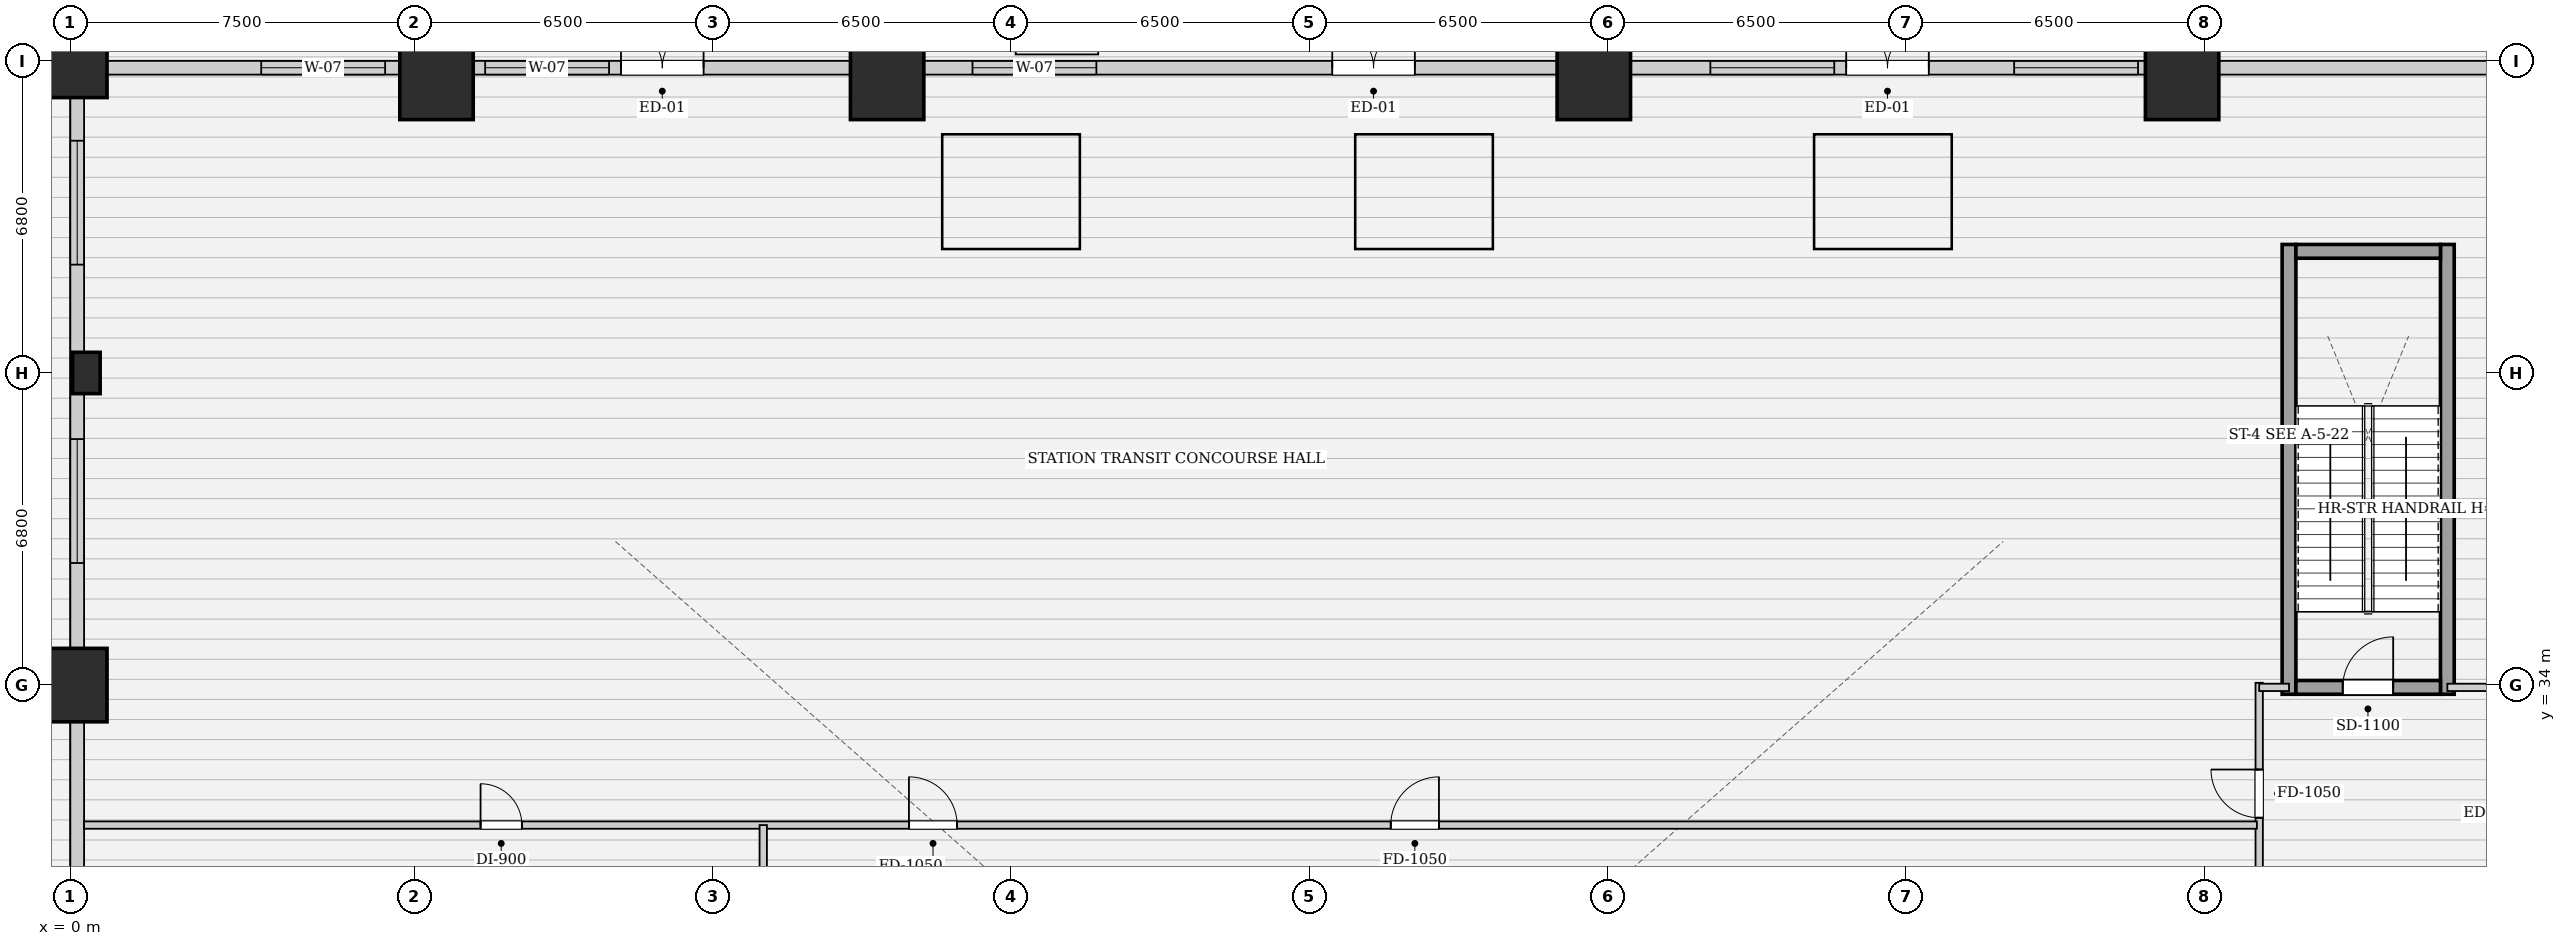
"""IFC4 building model, lengths in metres.
Left out: names, types, materials, properties, quantities, classifications, styles, units other than length and angle.
Written with IfcOpenShell. Run it as: python <this file> out.ifc"""

import sys

from ifc_helpers import new_model, si_unit, direction, frame, frame_2d, origin, origin_2d, place, context, subcontext, project, spatial, rectangle, extrude, element, fill, save


model = new_model("IFC4")
c1 = context("Model", 3, precision=1e-05, world=origin(), true_north=direction((0.0, 1.0)))
c2 = subcontext(c1, "Body", "Model", "MODEL_VIEW")
j1 = project(units=[si_unit("LENGTHUNIT", "METRE"), si_unit("PLANEANGLEUNIT", "RADIAN")], contexts=[c1])
p1 = place(None, origin())
s1 = spatial("IfcSite", under=j1, at=p1, CompositionType="ELEMENT")
p2 = place(p1, origin())
s2 = spatial("IfcBuilding", under=s1, at=p2, CompositionType="ELEMENT")
p3 = place(p2, origin())
s3 = spatial("IfcBuildingStorey", under=s2, at=p3, CompositionType="ELEMENT", Elevation=0.0)
for number, where, z_axis, x_axis in (
    (1, (0.0, 34.0, 0.0), (0.0, 0.0, 1.0), (1.0, 0.0, 0.0)),
    (2, (0.0, 47.6, 0.0), (0.0, 0.0, 1.0), (1.0, 0.0, 0.0)),
    (3, (7.98, 47.12, 0.0), (0.0, 0.0, 1.0), (1.0, 0.0, 0.0)),
    (4, (46.02, 47.12, 0.0), (0.0, 0.0, 1.0), (1.0, 0.0, 0.0)),
    (5, (17.8, 47.12, 0.0), (0.0, 0.0, 1.0), (1.0, 0.0, 0.0)),
    (6, (33.2, 47.12, 0.0), (0.0, 0.0, 1.0), (1.0, 0.0, 0.0)),
):
    element("IfcColumn", number, at=place(p3, frame(where, z_axis=z_axis, x_axis=x_axis)), inside=s3, PredefinedType="COLUMN", context=c2, shape_type="SweptSolid", body=[
        extrude(rectangle(XDim=1.6, YDim=1.6, at=origin_2d()), origin(), (0.0, 0.0, 1.0), 6.0),
    ])
p4 = place(p3, frame((0.35, 40.8, 0.0), z_axis=(0.0, 0.0, 1.0), x_axis=(1.0, 0.0, 0.0)))
e7 = element("IfcColumn", 7, at=p4, inside=s3, PredefinedType="PILASTER", context=c2, shape_type="SweptSolid", body=[
    extrude(rectangle(XDim=0.6, YDim=0.9, at=origin_2d()), origin(), (0.0, 0.0, 1.0), 6.0),
])
p5 = place(p3, frame((0.16, 47.45, 0.0), z_axis=(0.0, 0.0, 1.0), x_axis=(1.0, 0.0, 0.0)))
e8 = element("IfcWall", 8, at=p5, inside=s3, PredefinedType="SOLIDWALL", context=c2, shape_type="SweptSolid", body=[
    extrude(rectangle(XDim=53.68, YDim=0.3, at=frame_2d((26.84, 0.0))), origin(), (0.0, 0.0, 1.0), 4.565),
])
p6 = place(p5, frame((27.34, 0.0, 0.0)))
e9 = element("IfcOpeningElement", 9, at=p6, cuts=e8, PredefinedType="OPENING", context=c2, shape_type="SweptSolid", body=[
    extrude(rectangle(XDim=1.8, YDim=2.2, at=frame_2d((0.9, 1.1))), frame((0.0, 0.16, 0.0), z_axis=(0.0, -1.0, 0.0), x_axis=(1.0, 0.0, 0.0)), (0.0, 0.0, 1.0), 0.32),
])
p7 = place(p5, frame((11.84, 0.0, 0.0)))
e10 = element("IfcOpeningElement", 10, at=p7, cuts=e8, PredefinedType="OPENING", context=c2, shape_type="SweptSolid", body=[
    extrude(rectangle(XDim=1.8, YDim=2.2, at=frame_2d((0.9, 1.1))), frame((0.0, 0.16, 0.0), z_axis=(0.0, -1.0, 0.0), x_axis=(1.0, 0.0, 0.0)), (0.0, 0.0, 1.0), 0.32),
])
p8 = place(p5, frame((38.54, 0.0, 0.0)))
e11 = element("IfcOpeningElement", 11, at=p8, cuts=e8, PredefinedType="OPENING", context=c2, shape_type="SweptSolid", body=[
    extrude(rectangle(XDim=1.8, YDim=2.2, at=frame_2d((0.9, 1.1))), frame((0.0, 0.16, 0.0), z_axis=(0.0, -1.0, 0.0), x_axis=(1.0, 0.0, 0.0)), (0.0, 0.0, 1.0), 0.32),
])
p9 = place(p5, frame((4.0, 0.0, 0.9)))
e12 = element("IfcOpeningElement", 12, at=p9, cuts=e8, PredefinedType="OPENING", context=c2, shape_type="SweptSolid", body=[
    extrude(rectangle(XDim=2.7, YDim=2.1, at=frame_2d((1.35, 1.05))), frame((0.0, 0.16, 0.0), z_axis=(0.0, -1.0, 0.0), x_axis=(1.0, 0.0, 0.0)), (0.0, 0.0, 1.0), 0.32),
])
p10 = place(p5, frame((8.88, 0.0, 0.9)))
e13 = element("IfcOpeningElement", 13, at=p10, cuts=e8, PredefinedType="OPENING", context=c2, shape_type="SweptSolid", body=[
    extrude(rectangle(XDim=2.7, YDim=2.1, at=frame_2d((1.35, 1.05))), frame((0.0, 0.16, 0.0), z_axis=(0.0, -1.0, 0.0), x_axis=(1.0, 0.0, 0.0)), (0.0, 0.0, 1.0), 0.32),
])
p11 = place(p5, frame((19.5, 0.0, 0.9)))
e14 = element("IfcOpeningElement", 14, at=p11, cuts=e8, PredefinedType="OPENING", context=c2, shape_type="SweptSolid", body=[
    extrude(rectangle(XDim=2.7, YDim=2.1, at=frame_2d((1.35, 1.05))), frame((0.0, 0.16, 0.0), z_axis=(0.0, -1.0, 0.0), x_axis=(1.0, 0.0, 0.0)), (0.0, 0.0, 1.0), 0.32),
])
p12 = place(p5, frame((35.58, 0.0, 0.9)))
e15 = element("IfcOpeningElement", 15, at=p12, cuts=e8, PredefinedType="OPENING", context=c2, shape_type="SweptSolid", body=[
    extrude(rectangle(XDim=2.7, YDim=2.1, at=frame_2d((1.35, 1.05))), frame((0.0, 0.16, 0.0), z_axis=(0.0, -1.0, 0.0), x_axis=(1.0, 0.0, 0.0)), (0.0, 0.0, 1.0), 0.32),
])
p13 = place(p5, frame((42.2, 0.0, 0.9)))
e16 = element("IfcOpeningElement", 16, at=p13, cuts=e8, PredefinedType="OPENING", context=c2, shape_type="SweptSolid", body=[
    extrude(rectangle(XDim=2.7, YDim=2.1, at=frame_2d((1.35, 1.05))), frame((0.0, 0.16, 0.0), z_axis=(0.0, -1.0, 0.0), x_axis=(1.0, 0.0, 0.0)), (0.0, 0.0, 1.0), 0.32),
])
p14 = place(p3, frame((0.15, 0.16, 0.0), z_axis=(0.0, 0.0, 1.0), x_axis=(0.0, 1.0, 0.0)))
e17 = element("IfcWall", 17, at=p14, inside=s3, PredefinedType="SOLIDWALL", context=c2, shape_type="SweptSolid", body=[
    extrude(rectangle(XDim=47.28, YDim=0.3, at=frame_2d((23.64, 0.0))), origin(), (0.0, 0.0, 1.0), 4.565),
])
p15 = place(p14, frame((17.46, 0.0, 0.0)))
e18 = element("IfcOpeningElement", 18, at=p15, cuts=e17, PredefinedType="OPENING", context=c2, shape_type="SweptSolid", body=[
    extrude(rectangle(XDim=1.8, YDim=2.2, at=frame_2d((0.9, 1.1))), frame((0.0, 0.16, 0.0), z_axis=(0.0, -1.0, 0.0), x_axis=(1.0, 0.0, 0.0)), (0.0, 0.0, 1.0), 0.32),
])
p16 = place(p14, frame((3.33, 0.0, 0.9)))
e19 = element("IfcOpeningElement", 19, at=p16, cuts=e17, PredefinedType="OPENING", context=c2, shape_type="SweptSolid", body=[
    extrude(rectangle(XDim=2.7, YDim=2.1, at=frame_2d((1.35, 1.05))), frame((0.0, 0.16, 0.0), z_axis=(0.0, -1.0, 0.0), x_axis=(1.0, 0.0, 0.0)), (0.0, 0.0, 1.0), 0.32),
])
p17 = place(p14, frame((9.78, 0.0, 0.9)))
e20 = element("IfcOpeningElement", 20, at=p17, cuts=e17, PredefinedType="OPENING", context=c2, shape_type="SweptSolid", body=[
    extrude(rectangle(XDim=2.7, YDim=2.1, at=frame_2d((1.35, 1.05))), frame((0.0, 0.16, 0.0), z_axis=(0.0, -1.0, 0.0), x_axis=(1.0, 0.0, 0.0)), (0.0, 0.0, 1.0), 0.32),
])
p18 = place(p14, frame((36.5, 0.0, 0.9)))
e21 = element("IfcOpeningElement", 21, at=p18, cuts=e17, PredefinedType="OPENING", context=c2, shape_type="SweptSolid", body=[
    extrude(rectangle(XDim=2.7, YDim=2.1, at=frame_2d((1.35, 1.05))), frame((0.0, 0.16, 0.0), z_axis=(0.0, -1.0, 0.0), x_axis=(1.0, 0.0, 0.0)), (0.0, 0.0, 1.0), 0.32),
])
p19 = place(p14, frame((43.0, 0.0, 0.9)))
e22 = element("IfcOpeningElement", 22, at=p19, cuts=e17, PredefinedType="OPENING", context=c2, shape_type="SweptSolid", body=[
    extrude(rectangle(XDim=2.7, YDim=2.1, at=frame_2d((1.35, 1.05))), frame((0.0, 0.16, 0.0), z_axis=(0.0, -1.0, 0.0), x_axis=(1.0, 0.0, 0.0)), (0.0, 0.0, 1.0), 0.32),
])
for number, where, z_axis, x_axis in (
    (23, (48.35, 33.8, 0.0), (0.0, 0.0, 1.0), (0.0, 1.0, 0.0)),
    (24, (51.8, 33.8, 0.0), (0.0, 0.0, 1.0), (0.0, 1.0, 0.0)),
):
    element("IfcWall", number, at=place(p3, frame(where, z_axis=z_axis, x_axis=x_axis)), inside=s3, PredefinedType="SHEAR", context=c2, shape_type="SweptSolid", body=[
        extrude(rectangle(XDim=9.8, YDim=0.3, at=frame_2d((4.9, 0.0))), origin(), (0.0, 0.0, 1.0), 5.68),
    ])
p20 = place(p3, frame((48.5, 43.45, 0.0), z_axis=(0.0, 0.0, 1.0), x_axis=(1.0, 0.0, 0.0)))
e25 = element("IfcWall", 25, at=p20, inside=s3, PredefinedType="SHEAR", context=c2, shape_type="SweptSolid", body=[
    extrude(rectangle(XDim=3.15, YDim=0.3, at=frame_2d((1.575, 0.0))), origin(), (0.0, 0.0, 1.0), 5.68),
])
p21 = place(p3, frame((48.5, 33.95, 0.0), z_axis=(0.0, 0.0, 1.0), x_axis=(1.0, 0.0, 0.0)))
e26 = element("IfcWall", 26, at=p21, inside=s3, PredefinedType="SHEAR", context=c2, shape_type="SweptSolid", body=[
    extrude(rectangle(XDim=3.15, YDim=0.3, at=frame_2d((1.575, 0.0))), origin(), (0.0, 0.0, 1.0), 5.68),
])
p22 = place(p21, frame((1.02, 0.0, 0.0)))
e27 = element("IfcOpeningElement", 27, at=p22, cuts=e26, PredefinedType="OPENING", context=c2, shape_type="SweptSolid", body=[
    extrude(rectangle(XDim=1.1, YDim=2.05, at=frame_2d((0.55, 1.025))), frame((0.0, 0.16, 0.0), z_axis=(0.0, -1.0, 0.0), x_axis=(1.0, 0.0, 0.0)), (0.0, 0.0, 1.0), 0.32),
])
p23 = place(p3, frame((47.7, 29.05, 0.0), z_axis=(0.0, 0.0, 1.0), x_axis=(0.0, 1.0, 0.0)))
e28 = element("IfcWall", 28, at=p23, inside=s3, PredefinedType="PARTITIONING", context=c2, shape_type="SweptSolid", body=[
    extrude(rectangle(XDim=5.0, YDim=0.16, at=frame_2d((2.5, 0.0))), origin(), (0.0, 0.0, 1.0), 5.68),
])
p24 = place(p23, frame((2.06, 0.0, 0.0)))
e29 = element("IfcOpeningElement", 29, at=p24, cuts=e28, PredefinedType="OPENING", context=c2, shape_type="SweptSolid", body=[
    extrude(rectangle(XDim=1.05, YDim=2.05, at=frame_2d((0.525, 1.025))), frame((0.0, 0.09, 0.0), z_axis=(0.0, -1.0, 0.0), x_axis=(1.0, 0.0, 0.0)), (0.0, 0.0, 1.0), 0.18),
])
p25 = place(p3, frame((47.7, 33.95, 0.0), z_axis=(0.0, 0.0, 1.0), x_axis=(1.0, 0.0, 0.0)))
e30 = element("IfcWall", 30, at=p25, inside=s3, PredefinedType="PARTITIONING", context=c2, shape_type="SweptSolid", body=[
    extrude(rectangle(XDim=0.65, YDim=0.16, at=frame_2d((0.325, 0.0))), origin(), (0.0, 0.0, 1.0), 5.68),
])
p26 = place(p3, frame((51.8, 33.95, 0.0), z_axis=(0.0, 0.0, 1.0), x_axis=(1.0, 0.0, 0.0)))
e31 = element("IfcWall", 31, at=p26, inside=s3, PredefinedType="PARTITIONING", context=c2, shape_type="SweptSolid", body=[
    extrude(rectangle(XDim=1.92, YDim=0.16, at=frame_2d((0.96, 0.0))), origin(), (0.0, 0.0, 1.0), 5.68),
])
p27 = place(p3, frame((0.3, 30.95, 0.0), z_axis=(0.0, 0.0, 1.0), x_axis=(1.0, 0.0, 0.0)))
e32 = element("IfcWall", 32, at=p27, inside=s3, PredefinedType="PARTITIONING", context=c2, shape_type="SweptSolid", body=[
    extrude(rectangle(XDim=47.35, YDim=0.16, at=frame_2d((23.675, 0.0))), origin(), (0.0, 0.0, 1.0), 5.68),
])
p28 = place(p27, frame((17.975, 0.0, 0.0)))
e33 = element("IfcOpeningElement", 33, at=p28, cuts=e32, PredefinedType="OPENING", context=c2, shape_type="SweptSolid", body=[
    extrude(rectangle(XDim=1.05, YDim=2.05, at=frame_2d((0.525, 1.025))), frame((0.0, 0.09, 0.0), z_axis=(0.0, -1.0, 0.0), x_axis=(1.0, 0.0, 0.0)), (0.0, 0.0, 1.0), 0.18),
])
p29 = place(p27, frame((28.475, 0.0, 0.0)))
e34 = element("IfcOpeningElement", 34, at=p29, cuts=e32, PredefinedType="OPENING", context=c2, shape_type="SweptSolid", body=[
    extrude(rectangle(XDim=1.05, YDim=2.05, at=frame_2d((0.525, 1.025))), frame((0.0, 0.09, 0.0), z_axis=(0.0, -1.0, 0.0), x_axis=(1.0, 0.0, 0.0)), (0.0, 0.0, 1.0), 0.18),
])
p30 = place(p27, frame((8.64, 0.0, 0.0)))
e35 = element("IfcOpeningElement", 35, at=p30, cuts=e32, PredefinedType="OPENING", context=c2, shape_type="SweptSolid", body=[
    extrude(rectangle(XDim=0.9, YDim=2.05, at=frame_2d((0.45, 1.025))), frame((0.0, 0.09, 0.0), z_axis=(0.0, -1.0, 0.0), x_axis=(1.0, 0.0, 0.0)), (0.0, 0.0, 1.0), 0.18),
])
p31 = place(p3, frame((15.1, 14.98, 0.0), z_axis=(0.0, 0.0, 1.0), x_axis=(0.0, 1.0, 0.0)))
e36 = element("IfcWall", 36, at=p31, inside=s3, PredefinedType="PARTITIONING", context=c2, shape_type="SweptSolid", body=[
    extrude(rectangle(XDim=15.97, YDim=0.16, at=frame_2d((7.985, 0.0))), origin(), (0.0, 0.0, 1.0), 5.68),
])
p32 = place(p31, frame((4.225, 0.0, 0.0)))
e37 = element("IfcOpeningElement", 37, at=p32, cuts=e36, PredefinedType="OPENING", context=c2, shape_type="SweptSolid", body=[
    extrude(rectangle(XDim=1.05, YDim=2.05, at=frame_2d((0.525, 1.025))), frame((0.0, 0.09, 0.0), z_axis=(0.0, -1.0, 0.0), x_axis=(1.0, 0.0, 0.0)), (0.0, 0.0, 1.0), 0.18),
])
p33 = place(p6, origin())
e38 = element("IfcDoor", 38, at=p33, inside=s3, OperationType="DOUBLE_SWING_LEFT", PredefinedType="DOOR", context=c2, shape_type="SweptSolid", body=[
    extrude(rectangle(XDim=1.8, YDim=2.2, at=frame_2d((0.9, 1.1))), frame((0.0, 0.025, 0.0), z_axis=(0.0, -1.0, 0.0), x_axis=(1.0, 0.0, 0.0)), (0.0, 0.0, 1.0), 0.05),
])
fill(e9, e38)
p34 = place(p7, origin())
e39 = element("IfcDoor", 39, at=p34, inside=s3, OperationType="DOUBLE_SWING_LEFT", PredefinedType="DOOR", context=c2, shape_type="SweptSolid", body=[
    extrude(rectangle(XDim=1.8, YDim=2.2, at=frame_2d((0.9, 1.1))), frame((0.0, 0.025, 0.0), z_axis=(0.0, -1.0, 0.0), x_axis=(1.0, 0.0, 0.0)), (0.0, 0.0, 1.0), 0.05),
])
fill(e10, e39)
p35 = place(p8, origin())
e40 = element("IfcDoor", 40, at=p35, inside=s3, OperationType="DOUBLE_SWING_LEFT", PredefinedType="DOOR", context=c2, shape_type="SweptSolid", body=[
    extrude(rectangle(XDim=1.8, YDim=2.2, at=frame_2d((0.9, 1.1))), frame((0.0, 0.025, 0.0), z_axis=(0.0, -1.0, 0.0), x_axis=(1.0, 0.0, 0.0)), (0.0, 0.0, 1.0), 0.05),
])
fill(e11, e40)
p36 = place(p22, origin())
e41 = element("IfcDoor", 41, at=p36, inside=s3, OperationType="SINGLE_SWING_RIGHT", PredefinedType="DOOR", context=c2, shape_type="SweptSolid", body=[
    extrude(rectangle(XDim=1.1, YDim=2.05, at=frame_2d((0.55, 1.025))), frame((0.0, 0.025, 0.0), z_axis=(0.0, -1.0, 0.0), x_axis=(1.0, 0.0, 0.0)), (0.0, 0.0, 1.0), 0.05),
])
fill(e27, e41)
p37 = place(p24, origin())
e42 = element("IfcDoor", 42, at=p37, inside=s3, OperationType="SINGLE_SWING_RIGHT", PredefinedType="DOOR", context=c2, shape_type="SweptSolid", body=[
    extrude(rectangle(XDim=1.05, YDim=2.05, at=frame_2d((0.525, 1.025))), frame((0.0, 0.025, 0.0), z_axis=(0.0, -1.0, 0.0), x_axis=(1.0, 0.0, 0.0)), (0.0, 0.0, 1.0), 0.05),
])
fill(e29, e42)
p38 = place(p28, origin())
e43 = element("IfcDoor", 43, at=p38, inside=s3, OperationType="SINGLE_SWING_LEFT", PredefinedType="DOOR", context=c2, shape_type="SweptSolid", body=[
    extrude(rectangle(XDim=1.05, YDim=2.05, at=frame_2d((0.525, 1.025))), frame((0.0, 0.025, 0.0), z_axis=(0.0, -1.0, 0.0), x_axis=(1.0, 0.0, 0.0)), (0.0, 0.0, 1.0), 0.05),
])
fill(e33, e43)
p39 = place(p29, origin())
e44 = element("IfcDoor", 44, at=p39, inside=s3, OperationType="SINGLE_SWING_RIGHT", PredefinedType="DOOR", context=c2, shape_type="SweptSolid", body=[
    extrude(rectangle(XDim=1.05, YDim=2.05, at=frame_2d((0.525, 1.025))), frame((0.0, 0.025, 0.0), z_axis=(0.0, -1.0, 0.0), x_axis=(1.0, 0.0, 0.0)), (0.0, 0.0, 1.0), 0.05),
])
fill(e34, e44)
p40 = place(p30, origin())
e45 = element("IfcDoor", 45, at=p40, inside=s3, OperationType="SINGLE_SWING_LEFT", PredefinedType="DOOR", context=c2, shape_type="SweptSolid", body=[
    extrude(rectangle(XDim=0.9, YDim=2.05, at=frame_2d((0.45, 1.025))), frame((0.0, 0.025, 0.0), z_axis=(0.0, -1.0, 0.0), x_axis=(1.0, 0.0, 0.0)), (0.0, 0.0, 1.0), 0.05),
])
fill(e35, e45)
p41 = place(p9, origin())
e46 = element("IfcWindow", 46, at=p41, inside=s3, PartitioningType="TRIPLE_PANEL_VERTICAL", PredefinedType="WINDOW", context=c2, shape_type="SweptSolid", body=[
    extrude(rectangle(XDim=2.7, YDim=2.1, at=frame_2d((1.35, 1.05))), frame((0.0, 0.03, 0.0), z_axis=(0.0, -1.0, 0.0), x_axis=(1.0, 0.0, 0.0)), (0.0, 0.0, 1.0), 0.06),
])
fill(e12, e46)
p42 = place(p10, origin())
e47 = element("IfcWindow", 47, at=p42, inside=s3, PartitioningType="TRIPLE_PANEL_VERTICAL", PredefinedType="WINDOW", context=c2, shape_type="SweptSolid", body=[
    extrude(rectangle(XDim=2.7, YDim=2.1, at=frame_2d((1.35, 1.05))), frame((0.0, 0.03, 0.0), z_axis=(0.0, -1.0, 0.0), x_axis=(1.0, 0.0, 0.0)), (0.0, 0.0, 1.0), 0.06),
])
fill(e13, e47)
p43 = place(p11, origin())
e48 = element("IfcWindow", 48, at=p43, inside=s3, PartitioningType="TRIPLE_PANEL_VERTICAL", PredefinedType="WINDOW", context=c2, shape_type="SweptSolid", body=[
    extrude(rectangle(XDim=2.7, YDim=2.1, at=frame_2d((1.35, 1.05))), frame((0.0, 0.03, 0.0), z_axis=(0.0, -1.0, 0.0), x_axis=(1.0, 0.0, 0.0)), (0.0, 0.0, 1.0), 0.06),
])
fill(e14, e48)
p44 = place(p12, origin())
e49 = element("IfcWindow", 49, at=p44, inside=s3, PartitioningType="TRIPLE_PANEL_VERTICAL", PredefinedType="WINDOW", context=c2, shape_type="SweptSolid", body=[
    extrude(rectangle(XDim=2.7, YDim=2.1, at=frame_2d((1.35, 1.05))), frame((0.0, 0.03, 0.0), z_axis=(0.0, -1.0, 0.0), x_axis=(1.0, 0.0, 0.0)), (0.0, 0.0, 1.0), 0.06),
])
fill(e15, e49)
p45 = place(p13, origin())
e50 = element("IfcWindow", 50, at=p45, inside=s3, PartitioningType="TRIPLE_PANEL_VERTICAL", PredefinedType="WINDOW", context=c2, shape_type="SweptSolid", body=[
    extrude(rectangle(XDim=2.7, YDim=2.1, at=frame_2d((1.35, 1.05))), frame((0.0, 0.03, 0.0), z_axis=(0.0, -1.0, 0.0), x_axis=(1.0, 0.0, 0.0)), (0.0, 0.0, 1.0), 0.06),
])
fill(e16, e50)
p46 = place(p18, origin())
e51 = element("IfcWindow", 51, at=p46, inside=s3, PartitioningType="TRIPLE_PANEL_VERTICAL", PredefinedType="WINDOW", context=c2, shape_type="SweptSolid", body=[
    extrude(rectangle(XDim=2.7, YDim=2.1, at=frame_2d((1.35, 1.05))), frame((0.0, 0.03, 0.0), z_axis=(0.0, -1.0, 0.0), x_axis=(1.0, 0.0, 0.0)), (0.0, 0.0, 1.0), 0.06),
])
fill(e21, e51)
p47 = place(p19, origin())
e52 = element("IfcWindow", 52, at=p47, inside=s3, PartitioningType="TRIPLE_PANEL_VERTICAL", PredefinedType="WINDOW", context=c2, shape_type="SweptSolid", body=[
    extrude(rectangle(XDim=2.7, YDim=2.1, at=frame_2d((1.35, 1.05))), frame((0.0, 0.03, 0.0), z_axis=(0.0, -1.0, 0.0), x_axis=(1.0, 0.0, 0.0)), (0.0, 0.0, 1.0), 0.06),
])
fill(e22, e52)
save(model, sys.argv[1])
